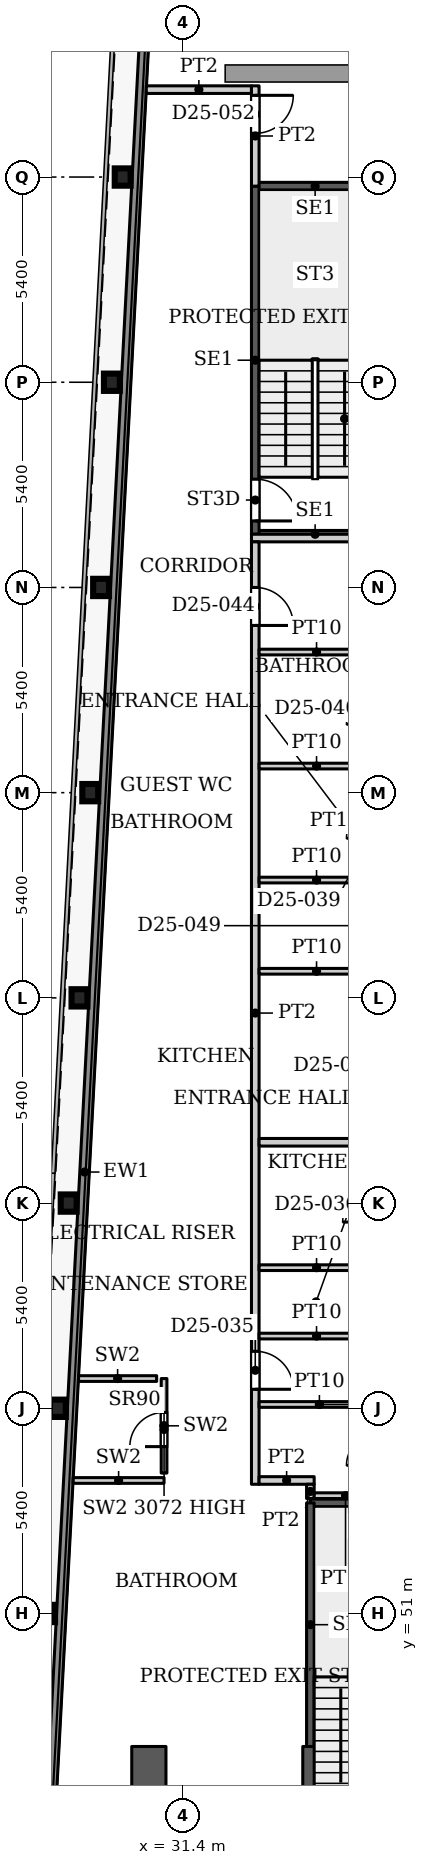
"""IFC4 building model, lengths in metres.
Left out: names, types, materials, properties, quantities, classifications, styles, units other than length and angle.
Written with IfcOpenShell. Run it as: python <this file> out.ifc"""

import sys

from ifc_helpers import new_model, si_unit, direction, frame, frame_2d, origin, origin_2d, place, context, subcontext, project, spatial, rectangle, i_section, extrude, source, transform, mapped, element, fill, save


model = new_model("IFC4")
c1 = context("Model", 3, precision=1e-05, world=origin(), true_north=direction((0.0, 1.0)))
c2 = subcontext(c1, "Body", "Model", "MODEL_VIEW")
j1 = project(units=[si_unit("LENGTHUNIT", "METRE"), si_unit("PLANEANGLEUNIT", "RADIAN")], contexts=[c1])
p1 = place(None, origin())
s1 = spatial("IfcSite", under=j1, at=p1, CompositionType="ELEMENT")
p2 = place(p1, origin())
s2 = spatial("IfcBuilding", under=s1, at=p2, CompositionType="ELEMENT")
p3 = place(p2, frame((0.0, 0.0, 109.7)))
s3 = spatial("IfcBuildingStorey", under=s2, at=p3, CompositionType="ELEMENT", Elevation=109.7)
for number, where, z_axis, x_axis in (
    (1, (27.822, 51.0, 0.0), (0.0, 0.0, 1.0), (1.0, 0.0, 0.0)),
    (2, (28.106, 56.4, 0.0), (0.0, 0.0, 1.0), (1.0, 0.0, 0.0)),
    (3, (28.39, 61.8, 0.0), (0.0, 0.0, 1.0), (1.0, 0.0, 0.0)),
    (4, (28.674, 67.2, 0.0), (0.0, 0.0, 1.0), (1.0, 0.0, 0.0)),
    (5, (28.958, 72.6, 0.0), (0.0, 0.0, 1.0), (1.0, 0.0, 0.0)),
    (6, (29.243, 78.0, 0.0), (0.0, 0.0, 1.0), (1.0, 0.0, 0.0)),
    (7, (29.527, 83.4, 0.0), (0.0, 0.0, 1.0), (1.0, 0.0, 0.0)),
    (8, (29.811, 88.8, 0.0), (0.0, 0.0, 1.0), (1.0, 0.0, 0.0)),
):
    element("IfcColumn", number, at=place(p3, frame(where, z_axis=z_axis, x_axis=x_axis)), inside=s3, PredefinedType="COLUMN", context=c2, shape_type="SweptSolid", body=[
        extrude(i_section(OverallWidth=0.418, OverallDepth=0.455, WebThickness=0.042, FlangeThickness=0.068, FilletRadius=0.014, at=origin_2d()), origin(), (0.0, 0.0, 1.0), 3.9),
    ])
p4 = place(p3, frame((34.75, 29.05, 0.0), z_axis=(0.0, 0.0, 1.0), x_axis=(0.0, 1.0, 0.0)))
e9 = element("IfcWall", 9, at=p4, inside=s3, PredefinedType="SHEAR", context=c2, shape_type="SweptSolid", body=[
    extrude(rectangle(XDim=18.45, YDim=0.4, at=frame_2d((9.225, 0.0))), origin(), (0.0, 0.0, 1.0), 3.9),
])
p5 = place(p4, frame((8.025, 0.0, 0.0)))
e10 = element("IfcOpeningElement", 10, at=p5, cuts=e9, PredefinedType="OPENING", context=c2, shape_type="SweptSolid", body=[
    extrude(rectangle(XDim=1.1, YDim=2.2, at=frame_2d((0.55, 1.1))), frame((0.0, 0.21, 0.0), z_axis=(0.0, -1.0, 0.0), x_axis=(1.0, 0.0, 0.0)), (0.0, 0.0, 1.0), 0.42),
])
p6 = place(p4, frame((10.875, 0.0, 0.0)))
e11 = element("IfcOpeningElement", 11, at=p6, cuts=e9, PredefinedType="OPENING", context=c2, shape_type="SweptSolid", body=[
    extrude(rectangle(XDim=1.1, YDim=2.2, at=frame_2d((0.55, 1.1))), frame((0.0, 0.21, 0.0), z_axis=(0.0, -1.0, 0.0), x_axis=(1.0, 0.0, 0.0)), (0.0, 0.0, 1.0), 0.42),
])
p7 = place(p4, frame((13.725, 0.0, 0.0)))
e12 = element("IfcOpeningElement", 12, at=p7, cuts=e9, PredefinedType="OPENING", context=c2, shape_type="SweptSolid", body=[
    extrude(rectangle(XDim=1.1, YDim=2.2, at=frame_2d((0.55, 1.1))), frame((0.0, 0.21, 0.0), z_axis=(0.0, -1.0, 0.0), x_axis=(1.0, 0.0, 0.0)), (0.0, 0.0, 1.0), 0.42),
])
p8 = place(p4, frame((15.95, 0.0, 0.0)))
e13 = element("IfcOpeningElement", 13, at=p8, cuts=e9, PredefinedType="OPENING", context=c2, shape_type="SweptSolid", body=[
    extrude(rectangle(XDim=1.1, YDim=2.2, at=frame_2d((0.55, 1.1))), frame((0.0, 0.21, 0.0), z_axis=(0.0, -1.0, 0.0), x_axis=(1.0, 0.0, 0.0)), (0.0, 0.0, 1.0), 0.42),
])
p9 = place(p3, frame((30.5, 29.05, 0.0), z_axis=(0.0, 0.0, 1.0), x_axis=(0.0, 1.0, 0.0)))
e14 = element("IfcWall", 14, at=p9, inside=s3, PredefinedType="SHEAR", context=c2, shape_type="SweptSolid", body=[
    extrude(rectangle(XDim=18.45, YDim=0.9, at=frame_2d((9.225, 0.0))), origin(), (0.0, 0.0, 1.0), 3.9),
])
p10 = place(p9, frame((1.147, 0.0, 0.0)))
e15 = element("IfcOpeningElement", 15, at=p10, cuts=e14, PredefinedType="OPENING", context=c2, shape_type="SweptSolid", body=[
    extrude(rectangle(XDim=0.9, YDim=2.2, at=frame_2d((0.45, 1.1))), frame((0.0, 0.46, 0.0), z_axis=(0.0, -1.0, 0.0), x_axis=(1.0, 0.0, 0.0)), (0.0, 0.0, 1.0), 0.92),
])
p11 = place(p9, frame((7.925, 0.0, 0.0)))
e16 = element("IfcOpeningElement", 16, at=p11, cuts=e14, PredefinedType="OPENING", context=c2, shape_type="SweptSolid", body=[
    extrude(rectangle(XDim=0.9, YDim=2.2, at=frame_2d((0.45, 1.1))), frame((0.0, 0.46, 0.0), z_axis=(0.0, -1.0, 0.0), x_axis=(1.0, 0.0, 0.0)), (0.0, 0.0, 1.0), 0.92),
])
p12 = place(p3, frame((27.195, 31.969, 0.0), z_axis=(0.0, 0.0, 1.0), x_axis=(0.052555284099, 0.998618016117, 0.0)))
e17 = element("IfcWall", 17, at=p12, inside=s3, PredefinedType="SOLIDWALL", context=c2, shape_type="SweptSolid", body=[
    extrude(rectangle(XDim=61.38, YDim=0.25, at=frame_2d((30.69, 0.0))), origin(), (0.0, 0.0, 1.0), 3.75),
])
p13 = place(p3, frame((34.75, 53.91, 0.0), z_axis=(0.0, 0.0, 1.0), x_axis=(1.0, 0.0, 0.0)))
e18 = element("IfcWall", 18, at=p13, inside=s3, PredefinedType="SHEAR", context=c2, shape_type="SweptSolid", body=[
    extrude(rectangle(XDim=3.15, YDim=0.2, at=frame_2d((1.575, 0.0))), origin(), (0.0, 0.0, 1.0), 3.9),
])
p14 = place(p3, frame((34.75, 47.5, 0.0), z_axis=(0.0, 0.0, 1.0), x_axis=(0.0, 1.0, 0.0)))
e19 = element("IfcWall", 19, at=p14, inside=s3, PredefinedType="SHEAR", context=c2, shape_type="SweptSolid", body=[
    extrude(rectangle(XDim=6.41, YDim=0.2, at=frame_2d((3.205, 0.0))), origin(), (0.0, 0.0, 1.0), 3.9),
])
for number, where, z_axis, x_axis in (
    (20, (33.3, 79.4, 0.0), (0.0, 0.0, 1.0), (1.0, 0.0, 0.0)),
    (21, (33.3, 88.56, 0.0), (0.0, 0.0, 1.0), (1.0, 0.0, 0.0)),
):
    element("IfcWall", number, at=place(p3, frame(where, z_axis=z_axis, x_axis=x_axis)), inside=s3, PredefinedType="SHEAR", context=c2, shape_type="SweptSolid", body=[
        extrude(rectangle(XDim=3.15, YDim=0.2, at=frame_2d((1.575, 0.0))), origin(), (0.0, 0.0, 1.0), 3.9),
    ])
p15 = place(p3, frame((33.3, 79.4, 0.0), z_axis=(0.0, 0.0, 1.0), x_axis=(0.0, 1.0, 0.0)))
e22 = element("IfcWall", 22, at=p15, inside=s3, PredefinedType="SHEAR", context=c2, shape_type="SweptSolid", body=[
    extrude(rectangle(XDim=9.16, YDim=0.2, at=frame_2d((4.58, 0.0))), origin(), (0.0, 0.0, 1.0), 3.9),
])
p16 = place(p15, frame((0.35, 0.0, 0.0)))
e23 = element("IfcOpeningElement", 23, at=p16, cuts=e22, PredefinedType="OPENING", context=c2, shape_type="SweptSolid", body=[
    extrude(rectangle(XDim=1.1, YDim=2.2, at=frame_2d((0.55, 1.1))), frame((0.0, 0.11, 0.0), z_axis=(0.0, -1.0, 0.0), x_axis=(1.0, 0.0, 0.0)), (0.0, 0.0, 1.0), 0.22),
])
p17 = place(p3, frame((28.508, 54.5, 0.0), z_axis=(0.0, 0.0, 1.0), x_axis=(1.0, 0.0, 0.0)))
e24 = element("IfcWall", 24, at=p17, inside=s3, PredefinedType="PARTITIONING", context=c2, shape_type="SweptSolid", body=[
    extrude(rectangle(XDim=2.392, YDim=0.15, at=frame_2d((1.196, 0.0))), origin(), (0.0, 0.0, 1.0), 3.9),
])
p18 = place(p3, frame((30.9, 54.695, 0.0), z_axis=(0.0, 0.0, 1.0), x_axis=(0.0, 1.0, 0.0)))
e25 = element("IfcWall", 25, at=p18, inside=s3, PredefinedType="PARTITIONING", context=c2, shape_type="SweptSolid", body=[
    extrude(rectangle(XDim=2.487, YDim=0.15, at=frame_2d((1.243, 0.0))), origin(), (0.0, 0.0, 1.0), 3.072),
])
p19 = place(p18, frame((0.696, 0.0, 0.0)))
e26 = element("IfcOpeningElement", 26, at=p19, cuts=e25, PredefinedType="OPENING", context=c2, shape_type="SweptSolid", body=[
    extrude(rectangle(XDim=0.9, YDim=2.2, at=frame_2d((0.45, 1.1))), frame((0.0, 0.085, 0.0), z_axis=(0.0, -1.0, 0.0), x_axis=(1.0, 0.0, 0.0)), (0.0, 0.0, 1.0), 0.17),
])
p20 = place(p3, frame((28.65, 57.182, 0.0), z_axis=(0.0, 0.0, 1.0), x_axis=(1.0, 0.0, 0.0)))
e27 = element("IfcWall", 27, at=p20, inside=s3, PredefinedType="PARTITIONING", context=c2, shape_type="SweptSolid", body=[
    extrude(rectangle(XDim=2.055, YDim=0.15, at=frame_2d((1.028, 0.0))), origin(), (0.0, 0.0, 1.0), 3.9),
])
p21 = place(p3, frame((30.432, 91.1, 0.0), z_axis=(0.0, 0.0, 1.0), x_axis=(1.0, 0.0, 0.0)))
e28 = element("IfcWall", 28, at=p21, inside=s3, PredefinedType="PARTITIONING", context=c2, shape_type="SweptSolid", body=[
    extrude(rectangle(XDim=2.768, YDim=0.2, at=frame_2d((1.384, 0.0))), origin(), (0.0, 0.0, 1.0), 3.6),
])
p22 = place(p3, frame((33.2, 79.3, 0.0), z_axis=(0.0, 0.0, 1.0), x_axis=(1.0, 0.0, 0.0)))
e29 = element("IfcWall", 29, at=p22, inside=s3, PredefinedType="PARTITIONING", context=c2, shape_type="SweptSolid", body=[
    extrude(rectangle(XDim=12.7, YDim=0.2, at=frame_2d((6.35, 0.0))), origin(), (0.0, 0.0, 1.0), 3.6),
])
p23 = place(p3, frame((33.3, 54.4, 0.0), z_axis=(0.0, 0.0, 1.0), x_axis=(0.0, 1.0, 0.0)))
e30 = element("IfcWall", 30, at=p23, inside=s3, PredefinedType="PARTITIONING", context=c2, shape_type="SweptSolid", body=[
    extrude(rectangle(XDim=24.8, YDim=0.2, at=frame_2d((12.4, 0.0))), origin(), (0.0, 0.0, 1.0), 3.6),
])
p24 = place(p23, frame((2.5, 0.0, 0.0)))
e31 = element("IfcOpeningElement", 31, at=p24, cuts=e30, PredefinedType="OPENING", context=c2, shape_type="SweptSolid", body=[
    extrude(rectangle(XDim=1.0, YDim=2.1, at=frame_2d((0.5, 1.05))), frame((0.0, 0.11, 0.0), z_axis=(0.0, -1.0, 0.0), x_axis=(1.0, 0.0, 0.0)), (0.0, 0.0, 1.0), 0.22),
])
p25 = place(p23, frame((22.6, 0.0, 0.0)))
e32 = element("IfcOpeningElement", 32, at=p25, cuts=e30, PredefinedType="OPENING", context=c2, shape_type="SweptSolid", body=[
    extrude(rectangle(XDim=1.0, YDim=2.1, at=frame_2d((0.5, 1.05))), frame((0.0, 0.11, 0.0), z_axis=(0.0, -1.0, 0.0), x_axis=(1.0, 0.0, 0.0)), (0.0, 0.0, 1.0), 0.22),
])
p26 = place(p3, frame((33.3, 88.56, 0.0), z_axis=(0.0, 0.0, 1.0), x_axis=(0.0, 1.0, 0.0)))
e33 = element("IfcWall", 33, at=p26, inside=s3, PredefinedType="PARTITIONING", context=c2, shape_type="SweptSolid", body=[
    extrude(rectangle(XDim=2.64, YDim=0.2, at=frame_2d((1.32, 0.0))), origin(), (0.0, 0.0, 1.0), 3.6),
])
p27 = place(p26, frame((1.39, 0.0, 0.0)))
e34 = element("IfcOpeningElement", 34, at=p27, cuts=e33, PredefinedType="OPENING", context=c2, shape_type="SweptSolid", body=[
    extrude(rectangle(XDim=1.0, YDim=2.1, at=frame_2d((0.5, 1.05))), frame((0.0, 0.11, 0.0), z_axis=(0.0, -1.0, 0.0), x_axis=(1.0, 0.0, 0.0)), (0.0, 0.0, 1.0), 0.22),
])
p28 = place(p3, frame((33.4, 54.5, 0.0), z_axis=(0.0, 0.0, 1.0), x_axis=(1.0, 0.0, 0.0)))
e35 = element("IfcWall", 35, at=p28, inside=s3, PredefinedType="PARTITIONING", context=c2, shape_type="SweptSolid", body=[
    extrude(rectangle(XDim=1.45, YDim=0.2, at=frame_2d((0.725, 0.0))), origin(), (0.0, 0.0, 1.0), 3.6),
])
p29 = place(p3, frame((33.4, 56.5, 0.0), z_axis=(0.0, 0.0, 1.0), x_axis=(1.0, 0.0, 0.0)))
e36 = element("IfcWall", 36, at=p29, inside=s3, PredefinedType="PARTITIONING", context=c2, shape_type="SweptSolid", body=[
    extrude(rectangle(XDim=3.175, YDim=0.15, at=frame_2d((1.587, 0.0))), origin(), (0.0, 0.0, 1.0), 3.072),
])
for number, where, z_axis, x_axis in (
    (37, (33.4, 58.3, 0.0), (0.0, 0.0, 1.0), (1.0, 0.0, 0.0)),
    (38, (33.4, 60.1, 0.0), (0.0, 0.0, 1.0), (1.0, 0.0, 0.0)),
):
    element("IfcWall", number, at=place(p3, frame(where, z_axis=z_axis, x_axis=x_axis)), inside=s3, PredefinedType="PARTITIONING", context=c2, shape_type="SweptSolid", body=[
        extrude(rectangle(XDim=3.025, YDim=0.15, at=frame_2d((1.513, 0.0))), origin(), (0.0, 0.0, 1.0), 3.6),
    ])
p30 = place(p3, frame((33.4, 63.4, 0.0), z_axis=(0.0, 0.0, 1.0), x_axis=(1.0, 0.0, 0.0)))
e39 = element("IfcWall", 39, at=p30, inside=s3, PredefinedType="PARTITIONING", context=c2, shape_type="SweptSolid", body=[
    extrude(rectangle(XDim=12.5, YDim=0.2, at=frame_2d((6.25, 0.0))), origin(), (0.0, 0.0, 1.0), 3.6),
])
for number, where, z_axis, x_axis in (
    (40, (33.4, 67.9, 0.0), (0.0, 0.0, 1.0), (1.0, 0.0, 0.0)),
    (41, (33.4, 70.3, 0.0), (0.0, 0.0, 1.0), (1.0, 0.0, 0.0)),
    (42, (33.4, 73.3, 0.0), (0.0, 0.0, 1.0), (1.0, 0.0, 0.0)),
    (43, (33.4, 76.3, 0.0), (0.0, 0.0, 1.0), (1.0, 0.0, 0.0)),
):
    element("IfcWall", number, at=place(p3, frame(where, z_axis=z_axis, x_axis=x_axis)), inside=s3, PredefinedType="PARTITIONING", context=c2, shape_type="SweptSolid", body=[
        extrude(rectangle(XDim=3.025, YDim=0.15, at=frame_2d((1.513, 0.0))), origin(), (0.0, 0.0, 1.0), 3.6),
    ])
p31 = place(p3, frame((34.75, 54.025, 0.0), z_axis=(0.0, 0.0, 1.0), x_axis=(0.0, 1.0, 0.0)))
e44 = element("IfcWall", 44, at=p31, inside=s3, PredefinedType="PARTITIONING", context=c2, shape_type="SweptSolid", body=[
    extrude(rectangle(XDim=0.375, YDim=0.2, at=frame_2d((0.188, 0.0))), origin(), (0.0, 0.0, 1.0), 3.6),
])
p32 = place(p3, frame((34.85, 54.1, 0.0), z_axis=(0.0, 0.0, 1.0), x_axis=(1.0, 0.0, 0.0)))
e45 = element("IfcWall", 45, at=p32, inside=s3, PredefinedType="PARTITIONING", context=c2, shape_type="SweptSolid", body=[
    extrude(rectangle(XDim=1.65, YDim=0.15, at=frame_2d((0.825, 0.0))), origin(), (0.0, 0.0, 1.0), 3.6),
])
m1 = source(origin(), c2, "Body", "SweptSolid", [
    extrude(rectangle(XDim=0.9, YDim=2.2, at=frame_2d((0.45, 1.1))), frame((0.0, 0.025, 0.0), z_axis=(0.0, -1.0, 0.0), x_axis=(1.0, 0.0, 0.0)), (0.0, 0.0, 1.0), 0.05),
])
p33 = place(p19, origin())
e46 = element("IfcDoor", 46, at=p33, inside=s3, OperationType="SINGLE_SWING_LEFT", PredefinedType="DOOR", context=c2, shape_type="MappedRepresentation", body=[
    mapped(m1, transform((0.0, 0.0, 0.0), x_axis=(1.0, 0.0, 0.0), y_axis=(0.0, 1.0, 0.0), z_axis=(0.0, 0.0, 1.0), scale=1.0)),
])
fill(e26, e46)
m2 = source(origin(), c2, "Body", "SweptSolid", [
    extrude(rectangle(XDim=1.1, YDim=2.2, at=frame_2d((0.55, 1.1))), frame((0.0, 0.025, 0.0), z_axis=(0.0, -1.0, 0.0), x_axis=(1.0, 0.0, 0.0)), (0.0, 0.0, 1.0), 0.05),
])
p34 = place(p16, origin())
e47 = element("IfcDoor", 47, at=p34, inside=s3, OperationType="SINGLE_SWING_RIGHT", PredefinedType="DOOR", context=c2, shape_type="MappedRepresentation", body=[
    mapped(m2, transform((0.0, 0.0, 0.0), x_axis=(1.0, 0.0, 0.0), y_axis=(0.0, 1.0, 0.0), z_axis=(0.0, 0.0, 1.0), scale=1.0)),
])
fill(e23, e47)
m3 = source(origin(), c2, "Body", "SweptSolid", [
    extrude(rectangle(XDim=1.0, YDim=2.1, at=frame_2d((0.5, 1.05))), frame((0.0, 0.025, 0.0), z_axis=(0.0, -1.0, 0.0), x_axis=(1.0, 0.0, 0.0)), (0.0, 0.0, 1.0), 0.05),
])
p35 = place(p24, origin())
e48 = element("IfcDoor", 48, at=p35, inside=s3, OperationType="SINGLE_SWING_RIGHT", PredefinedType="DOOR", context=c2, shape_type="MappedRepresentation", body=[
    mapped(m3, transform((0.0, 0.0, 0.0), x_axis=(1.0, 0.0, 0.0), y_axis=(0.0, 1.0, 0.0), z_axis=(0.0, 0.0, 1.0), scale=1.0)),
])
fill(e31, e48)
p36 = place(p25, origin())
e49 = element("IfcDoor", 49, at=p36, inside=s3, OperationType="SINGLE_SWING_RIGHT", PredefinedType="DOOR", context=c2, shape_type="MappedRepresentation", body=[
    mapped(m3, transform((0.0, 0.0, 0.0), x_axis=(1.0, 0.0, 0.0), y_axis=(0.0, 1.0, 0.0), z_axis=(0.0, 0.0, 1.0), scale=1.0)),
])
fill(e32, e49)
m4 = source(origin(), c2, "Body", "SweptSolid", [
    extrude(rectangle(XDim=1.0, YDim=2.1, at=frame_2d((0.5, 1.05))), frame((0.0, 0.025, 0.0), z_axis=(0.0, -1.0, 0.0), x_axis=(1.0, 0.0, 0.0)), (0.0, 0.0, 1.0), 0.05),
])
p37 = place(p27, origin())
e50 = element("IfcDoor", 50, at=p37, inside=s3, OperationType="SINGLE_SWING_RIGHT", PredefinedType="DOOR", context=c2, shape_type="MappedRepresentation", body=[
    mapped(m4, transform((0.0, 0.0, 0.0), x_axis=(1.0, 0.0, 0.0), y_axis=(0.0, 1.0, 0.0), z_axis=(0.0, 0.0, 1.0), scale=1.0)),
])
fill(e34, e50)
save(model, sys.argv[1])
